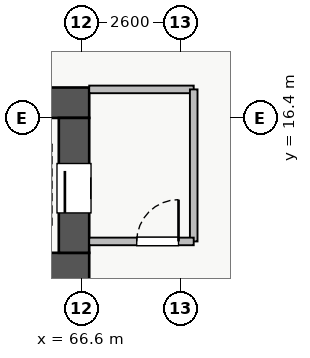
"""IFC4 building model, lengths in metres.
Left out: names, types, materials, properties, quantities, classifications, styles, units other than length and angle.
Written with IfcOpenShell. Run it as: python <this file> out.ifc"""

import sys

from ifc_helpers import new_model, si_unit, direction, frame, frame_2d, origin, place, context, subcontext, project, spatial, rectangle, extrude, source, transform, mapped, element, fill, save


model = new_model("IFC4")
c1 = context("Model", 3, precision=1e-05, world=origin(), true_north=direction((0.0, 1.0)))
c2 = subcontext(c1, "Body", "Model", "MODEL_VIEW")
j1 = project(units=[si_unit("LENGTHUNIT", "METRE"), si_unit("PLANEANGLEUNIT", "RADIAN")], contexts=[c1])
p1 = place(None, origin())
s1 = spatial("IfcSite", under=j1, at=p1, CompositionType="ELEMENT")
p2 = place(p1, origin())
s2 = spatial("IfcBuilding", under=s1, at=p2, CompositionType="ELEMENT")
p3 = place(p2, origin())
s3 = spatial("IfcBuildingStorey", under=s2, at=p3, CompositionType="ELEMENT", Elevation=0.0)
p4 = place(p3, frame((54.2, 12.45, 0.0), z_axis=(0.0, 0.0, 1.0), x_axis=(1.0, 0.0, 0.0)))
e1 = element("IfcWall", 1, at=p4, inside=s3, PredefinedType="SHEAR", context=c2, shape_type="SweptSolid", body=[
    extrude(rectangle(XDim=12.6, YDim=0.8, at=frame_2d((6.3, 0.0))), origin(), (0.0, 0.0, 1.0), 5.0),
])
p5 = place(p4, frame((8.2, 0.0, 0.0)))
e2 = element("IfcOpeningElement", 2, at=p5, cuts=e1, PredefinedType="OPENING", context=c2, shape_type="SweptSolid", body=[
    extrude(rectangle(XDim=1.1, YDim=2.05, at=frame_2d((0.55, 1.025))), frame((0.0, 0.41, 0.0), z_axis=(0.0, -1.0, 0.0), x_axis=(1.0, 0.0, 0.0)), (0.0, 0.0, 1.0), 0.82),
])
p6 = place(p3, frame((54.2, 16.8, 0.0), z_axis=(0.0, 0.0, 1.0), x_axis=(1.0, 0.0, 0.0)))
e3 = element("IfcWall", 3, at=p6, inside=s3, PredefinedType="SHEAR", context=c2, shape_type="SweptSolid", body=[
    extrude(rectangle(XDim=12.6, YDim=0.8, at=frame_2d((6.3, 0.0))), origin(), (0.0, 0.0, 1.0), 5.0),
])
p7 = place(p3, frame((66.4, 12.85, 0.0), z_axis=(0.0, 0.0, 1.0), x_axis=(0.0, 1.0, 0.0)))
e4 = element("IfcWall", 4, at=p7, inside=s3, PredefinedType="SHEAR", context=c2, shape_type="SweptSolid", body=[
    extrude(rectangle(XDim=3.55, YDim=0.8, at=frame_2d((1.775, 0.0))), origin(), (0.0, 0.0, 1.0), 5.0),
])
p8 = place(p7, frame((1.05, 0.0, 0.0)))
e5 = element("IfcOpeningElement", 5, at=p8, cuts=e4, PredefinedType="OPENING", context=c2, shape_type="SweptSolid", body=[
    extrude(rectangle(XDim=1.3, YDim=2.05, at=frame_2d((0.65, 1.025))), frame((0.0, 0.41, 0.0), z_axis=(0.0, -1.0, 0.0), x_axis=(1.0, 0.0, 0.0)), (0.0, 0.0, 1.0), 0.82),
])
p9 = place(p3, frame((66.8, 17.15, 0.0), z_axis=(0.0, 0.0, 1.0), x_axis=(1.0, 0.0, 0.0)))
e6 = element("IfcWall", 6, at=p9, inside=s3, PredefinedType="PARTITIONING", context=c2, shape_type="SweptSolid", body=[
    extrude(rectangle(XDim=2.75, YDim=0.2, at=frame_2d((1.375, 0.0))), origin(), (0.0, 0.0, 1.0), 4.78),
])
p10 = place(p3, frame((69.55, 13.15, 0.0), z_axis=(0.0, 0.0, 1.0), x_axis=(0.0, 1.0, 0.0)))
e7 = element("IfcWall", 7, at=p10, inside=s3, PredefinedType="PARTITIONING", context=c2, shape_type="SweptSolid", body=[
    extrude(rectangle(XDim=4.0, YDim=0.2, at=frame_2d((2.0, 0.0))), origin(), (0.0, 0.0, 1.0), 4.78),
])
p11 = place(p3, frame((66.8, 13.15, 0.0), z_axis=(0.0, 0.0, 1.0), x_axis=(1.0, 0.0, 0.0)))
e8 = element("IfcWall", 8, at=p11, inside=s3, PredefinedType="PARTITIONING", context=c2, shape_type="SweptSolid", body=[
    extrude(rectangle(XDim=2.75, YDim=0.2, at=frame_2d((1.375, 0.0))), origin(), (0.0, 0.0, 1.0), 4.78),
])
p12 = place(p11, frame((1.25, 0.0, 0.0)))
e9 = element("IfcOpeningElement", 9, at=p12, cuts=e8, PredefinedType="OPENING", context=c2, shape_type="SweptSolid", body=[
    extrude(rectangle(XDim=1.1, YDim=2.05, at=frame_2d((0.55, 1.025))), frame((0.0, 0.11, 0.0), z_axis=(0.0, -1.0, 0.0), x_axis=(1.0, 0.0, 0.0)), (0.0, 0.0, 1.0), 0.22),
])
m1 = source(origin(), c2, "Body", "SweptSolid", [
    extrude(rectangle(XDim=1.3, YDim=2.05, at=frame_2d((0.65, 1.025))), frame((0.0, 0.025, 0.0), z_axis=(0.0, -1.0, 0.0), x_axis=(1.0, 0.0, 0.0)), (0.0, 0.0, 1.0), 0.05),
])
p13 = place(p8, origin())
e10 = element("IfcDoor", 10, at=p13, inside=s3, OperationType="SLIDING_TO_RIGHT", PredefinedType="DOOR", context=c2, shape_type="MappedRepresentation", body=[
    mapped(m1, transform((0.0, 0.0, 0.0), x_axis=(1.0, 0.0, 0.0), y_axis=(0.0, 1.0, 0.0), z_axis=(0.0, 0.0, 1.0), scale=1.0)),
])
fill(e5, e10)
m2 = source(origin(), c2, "Body", "SweptSolid", [
    extrude(rectangle(XDim=1.1, YDim=2.05, at=frame_2d((0.55, 1.025))), frame((0.0, 0.025, 0.0), z_axis=(0.0, -1.0, 0.0), x_axis=(1.0, 0.0, 0.0)), (0.0, 0.0, 1.0), 0.05),
])
p14 = place(p12, origin())
e11 = element("IfcDoor", 11, at=p14, inside=s3, OperationType="SINGLE_SWING_RIGHT", PredefinedType="DOOR", context=c2, shape_type="MappedRepresentation", body=[
    mapped(m2, transform((0.0, 0.0, 0.0), x_axis=(1.0, 0.0, 0.0), y_axis=(0.0, 1.0, 0.0), z_axis=(0.0, 0.0, 1.0), scale=1.0)),
])
fill(e9, e11)
save(model, sys.argv[1])
